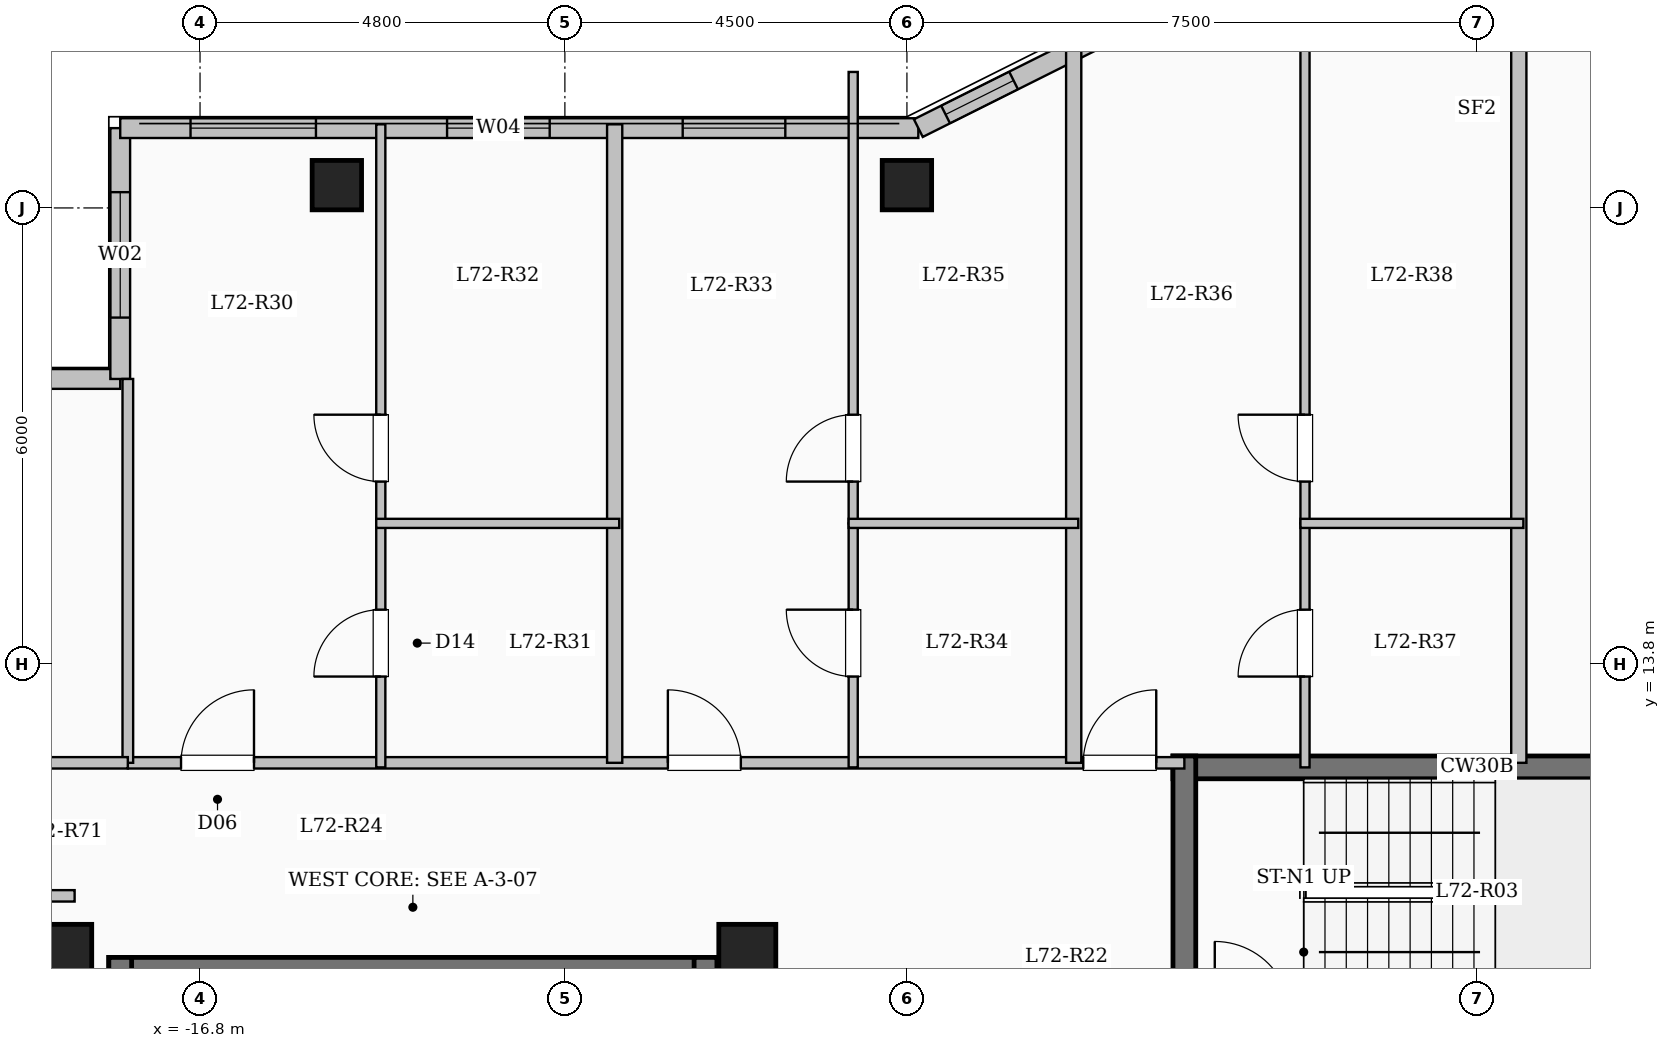
"""IFC4 building model, lengths in metres.
Left out: names, types, materials, properties, quantities, classifications, styles, units other than length and angle.
Written with IfcOpenShell. Run it as: python <this file> out.ifc"""

import sys

from ifc_helpers import new_model, si_unit, direction, frame, frame_2d, origin, origin_2d, place, context, subcontext, project, spatial, rectangle, extrude, element, fill, save


model = new_model("IFC4")
c1 = context("Model", 3, precision=1e-05, world=origin(), true_north=direction((0.0, 1.0)))
c2 = subcontext(c1, "Body", "Model", "MODEL_VIEW")
j1 = project(units=[si_unit("LENGTHUNIT", "METRE"), si_unit("PLANEANGLEUNIT", "RADIAN")], contexts=[c1])
p1 = place(None, origin())
s1 = spatial("IfcSite", under=j1, at=p1, CompositionType="ELEMENT")
p2 = place(p1, origin())
s2 = spatial("IfcBuilding", under=s1, at=p2, CompositionType="ELEMENT")
p3 = place(p2, frame((0.0, 0.0, 264.95)))
s3 = spatial("IfcBuildingStorey", under=s2, at=p3, CompositionType="ELEMENT", Elevation=264.95)
for number, where, z_axis, x_axis in (
    (1, (-9.6, 10.0, 0.0), (0.0, 0.0, 1.0), (1.0, 0.0, 0.0)),
    (2, (-18.6, 10.0, 0.0), (0.0, 0.0, 1.0), (1.0, 0.0, 0.0)),
):
    element("IfcColumn", number, at=place(p3, frame(where, z_axis=z_axis, x_axis=x_axis)), inside=s3, PredefinedType="COLUMN", context=c2, shape_type="SweptSolid", body=[
        extrude(rectangle(XDim=0.75, YDim=0.75, at=origin_2d()), origin(), (0.0, 0.0, 1.0), 3.35),
    ])
for number, where, z_axis, x_axis in (
    (3, (-15.0, 20.1, 0.0), (0.0, 0.0, 1.0), (1.0, 0.0, 0.0)),
    (4, (-7.5, 20.1, 0.0), (0.0, 0.0, 1.0), (1.0, 0.0, 0.0)),
):
    element("IfcColumn", number, at=place(p3, frame(where, z_axis=z_axis, x_axis=x_axis)), inside=s3, PredefinedType="COLUMN", context=c2, shape_type="SweptSolid", body=[
        extrude(rectangle(XDim=0.65, YDim=0.65, at=origin_2d()), origin(), (0.0, 0.0, 1.0), 3.35),
    ])
p4 = place(p3, frame((-22.65, 17.55, 0.0), z_axis=(0.0, 0.0, 1.0), x_axis=(1.0, 0.0, 0.0)))
e5 = element("IfcWall", 5, at=p4, inside=s3, PredefinedType="SOLIDWALL", context=c2, shape_type="SweptSolid", body=[
    extrude(rectangle(XDim=4.8, YDim=0.26, at=frame_2d((2.4, 0.0))), origin(), (0.0, 0.0, 1.0), 3.1),
])
p5 = place(p4, frame((1.425, 0.0, 0.9)))
e6 = element("IfcOpeningElement", 6, at=p5, cuts=e5, PredefinedType="OPENING", context=c2, shape_type="SweptSolid", body=[
    extrude(rectangle(XDim=2.0, YDim=1.7, at=frame_2d((1.0, 0.85))), frame((0.0, 0.14, 0.0), z_axis=(0.0, -1.0, 0.0), x_axis=(1.0, 0.0, 0.0)), (0.0, 0.0, 1.0), 0.28),
])
p6 = place(p3, frame((-17.85, 17.55, 0.0), z_axis=(0.0, 0.0, 1.0), x_axis=(0.0, 1.0, 0.0)))
e7 = element("IfcWall", 7, at=p6, inside=s3, PredefinedType="SOLIDWALL", context=c2, shape_type="SweptSolid", body=[
    extrude(rectangle(XDim=3.3, YDim=0.26, at=frame_2d((1.65, 0.0))), origin(), (0.0, 0.0, 1.0), 3.1),
])
p7 = place(p6, frame((0.808, 0.0, 0.9)))
e8 = element("IfcOpeningElement", 8, at=p7, cuts=e7, PredefinedType="OPENING", context=c2, shape_type="SweptSolid", body=[
    extrude(rectangle(XDim=1.65, YDim=1.6, at=frame_2d((0.825, 0.8))), frame((0.0, 0.14, 0.0), z_axis=(0.0, -1.0, 0.0), x_axis=(1.0, 0.0, 0.0)), (0.0, 0.0, 1.0), 0.28),
])
p8 = place(p3, frame((-17.85, 20.85, 0.0), z_axis=(0.0, 0.0, 1.0), x_axis=(1.0, 0.0, 0.0)))
e9 = element("IfcWall", 9, at=p8, inside=s3, PredefinedType="SOLIDWALL", context=c2, shape_type="SweptSolid", body=[
    extrude(rectangle(XDim=10.5, YDim=0.26, at=frame_2d((5.25, 0.0))), origin(), (0.0, 0.0, 1.0), 3.1),
])
p9 = place(p8, frame((0.925, 0.0, 0.9)))
e10 = element("IfcOpeningElement", 10, at=p9, cuts=e9, PredefinedType="OPENING", context=c2, shape_type="SweptSolid", body=[
    extrude(rectangle(XDim=1.65, YDim=1.6, at=frame_2d((0.825, 0.8))), frame((0.0, 0.14, 0.0), z_axis=(0.0, -1.0, 0.0), x_axis=(1.0, 0.0, 0.0)), (0.0, 0.0, 1.0), 0.28),
])
p10 = place(p8, frame((4.3, 0.0, 0.95)))
e11 = element("IfcOpeningElement", 11, at=p10, cuts=e9, PredefinedType="OPENING", context=c2, shape_type="SweptSolid", body=[
    extrude(rectangle(XDim=1.35, YDim=1.55, at=frame_2d((0.675, 0.775))), frame((0.0, 0.14, 0.0), z_axis=(0.0, -1.0, 0.0), x_axis=(1.0, 0.0, 0.0)), (0.0, 0.0, 1.0), 0.28),
])
p11 = place(p8, frame((7.4, 0.0, 0.95)))
e12 = element("IfcOpeningElement", 12, at=p11, cuts=e9, PredefinedType="OPENING", context=c2, shape_type="SweptSolid", body=[
    extrude(rectangle(XDim=1.35, YDim=1.55, at=frame_2d((0.675, 0.775))), frame((0.0, 0.14, 0.0), z_axis=(0.0, -1.0, 0.0), x_axis=(1.0, 0.0, 0.0)), (0.0, 0.0, 1.0), 0.28),
])
p12 = place(p3, frame((-7.35, 20.85, 0.0), z_axis=(0.0, 0.0, 1.0), x_axis=(0.894427191, 0.4472135955, 0.0)))
e13 = element("IfcWall", 13, at=p12, inside=s3, PredefinedType="SOLIDWALL", context=c2, shape_type="SweptSolid", body=[
    extrude(rectangle(XDim=3.354, YDim=0.26, at=frame_2d((1.677, 0.0))), origin(), (0.0, 0.0, 1.0), 3.1),
])
p13 = place(p12, frame((0.401, 0.0, 0.95)))
e14 = element("IfcOpeningElement", 14, at=p13, cuts=e13, PredefinedType="OPENING", context=c2, shape_type="SweptSolid", body=[
    extrude(rectangle(XDim=1.0, YDim=1.5, at=frame_2d((0.5, 0.75))), frame((0.0, 0.14, 0.0), z_axis=(0.0, -1.0, 0.0), x_axis=(1.0, 0.0, 0.0)), (0.0, 0.0, 1.0), 0.28),
])
p14 = place(p3, frame((-18.0, 9.79, 0.0), z_axis=(0.0, 0.0, 1.0), x_axis=(1.0, 0.0, 0.0)))
e15 = element("IfcWall", 15, at=p14, inside=s3, PredefinedType="SHEAR", context=c2, shape_type="SweptSolid", body=[
    extrude(rectangle(XDim=8.0, YDim=0.3, at=frame_2d((4.0, 0.0))), origin(), (0.0, 0.0, 1.0), 3.35),
])
for number, where, z_axis, x_axis in (
    (16, (-17.85, 6.35, 0.0), (0.0, 0.0, 1.0), (0.0, 1.0, 0.0)),
    (17, (-10.15, 6.35, 0.0), (0.0, 0.0, 1.0), (0.0, 1.0, 0.0)),
):
    element("IfcWall", number, at=place(p3, frame(where, z_axis=z_axis, x_axis=x_axis)), inside=s3, PredefinedType="SHEAR", context=c2, shape_type="SweptSolid", body=[
        extrude(rectangle(XDim=3.59, YDim=0.3, at=frame_2d((1.795, 0.0))), origin(), (0.0, 0.0, 1.0), 3.35),
    ])
p15 = place(p3, frame((-4.0, 12.44, 0.0), z_axis=(0.0, 0.0, 1.0), x_axis=(1.0, 0.0, 0.0)))
e18 = element("IfcWall", 18, at=p15, inside=s3, PredefinedType="SHEAR", context=c2, shape_type="SweptSolid", body=[
    extrude(rectangle(XDim=8.0, YDim=0.3, at=frame_2d((4.0, 0.0))), origin(), (0.0, 0.0, 1.0), 3.35),
])
p16 = place(p3, frame((-3.85, 9.0, 0.0), z_axis=(0.0, 0.0, 1.0), x_axis=(0.0, 1.0, 0.0)))
e19 = element("IfcWall", 19, at=p16, inside=s3, PredefinedType="SHEAR", context=c2, shape_type="SweptSolid", body=[
    extrude(rectangle(XDim=3.59, YDim=0.3, at=frame_2d((1.795, 0.0))), origin(), (0.0, 0.0, 1.0), 3.35),
])
p17 = place(p3, frame((-17.75, 12.5, 0.0), z_axis=(0.0, 0.0, 1.0), x_axis=(1.0, 0.0, 0.0)))
e20 = element("IfcWall", 20, at=p17, inside=s3, PredefinedType="PARTITIONING", context=c2, shape_type="SweptSolid", body=[
    extrude(rectangle(XDim=13.9, YDim=0.15, at=frame_2d((6.95, 0.0))), origin(), (0.0, 0.0, 1.0), 3.1),
])
p18 = place(p17, frame((0.7, 0.0, 0.0)))
e21 = element("IfcOpeningElement", 21, at=p18, cuts=e20, PredefinedType="OPENING", context=c2, shape_type="SweptSolid", body=[
    extrude(rectangle(XDim=0.96, YDim=2.15, at=frame_2d((0.48, 1.075))), frame((0.0, 0.085, 0.0), z_axis=(0.0, -1.0, 0.0), x_axis=(1.0, 0.0, 0.0)), (0.0, 0.0, 1.0), 0.17),
])
p19 = place(p17, frame((7.105, 0.0, 0.0)))
e22 = element("IfcOpeningElement", 22, at=p19, cuts=e20, PredefinedType="OPENING", context=c2, shape_type="SweptSolid", body=[
    extrude(rectangle(XDim=0.96, YDim=2.15, at=frame_2d((0.48, 1.075))), frame((0.0, 0.085, 0.0), z_axis=(0.0, -1.0, 0.0), x_axis=(1.0, 0.0, 0.0)), (0.0, 0.0, 1.0), 0.17),
])
p20 = place(p17, frame((12.57, 0.0, 0.0)))
e23 = element("IfcOpeningElement", 23, at=p20, cuts=e20, PredefinedType="OPENING", context=c2, shape_type="SweptSolid", body=[
    extrude(rectangle(XDim=0.96, YDim=2.15, at=frame_2d((0.48, 1.075))), frame((0.0, 0.085, 0.0), z_axis=(0.0, -1.0, 0.0), x_axis=(1.0, 0.0, 0.0)), (0.0, 0.0, 1.0), 0.17),
])
p21 = place(p3, frame((0.55, 12.5, 0.0), z_axis=(0.0, 0.0, 1.0), x_axis=(0.0, 1.0, 0.0)))
e24 = element("IfcWall", 24, at=p21, inside=s3, PredefinedType="SOLIDWALL", context=c2, shape_type="SweptSolid", body=[
    extrude(rectangle(XDim=9.88, YDim=0.2, at=frame_2d((4.94, 0.0))), origin(), (0.0, 0.0, 1.0), 3.1),
])
p22 = place(p3, frame((-11.345, 12.5, 0.0), z_axis=(0.0, 0.0, 1.0), x_axis=(0.0, 1.0, 0.0)))
e25 = element("IfcWall", 25, at=p22, inside=s3, PredefinedType="SOLIDWALL", context=c2, shape_type="SweptSolid", body=[
    extrude(rectangle(XDim=8.4, YDim=0.2, at=frame_2d((4.2, 0.0))), origin(), (0.0, 0.0, 1.0), 3.1),
])
p23 = place(p3, frame((-14.422, 12.44, 0.0), z_axis=(0.0, 0.0, 1.0), x_axis=(0.0, 1.0, 0.0)))
e26 = element("IfcWall", 26, at=p23, inside=s3, PredefinedType="PARTITIONING", context=c2, shape_type="SweptSolid", body=[
    extrude(rectangle(XDim=3.21, YDim=0.12, at=frame_2d((1.605, 0.0))), origin(), (0.0, 0.0, 1.0), 3.1),
])
p24 = place(p23, frame((1.195, 0.0, 0.0)))
e27 = element("IfcOpeningElement", 27, at=p24, cuts=e26, PredefinedType="OPENING", context=c2, shape_type="SweptSolid", body=[
    extrude(rectangle(XDim=0.88, YDim=2.1, at=frame_2d((0.44, 1.05))), frame((0.0, 0.07, 0.0), z_axis=(0.0, -1.0, 0.0), x_axis=(1.0, 0.0, 0.0)), (0.0, 0.0, 1.0), 0.14),
])
p25 = place(p3, frame((-14.422, 15.65, 0.0), z_axis=(0.0, 0.0, 1.0), x_axis=(0.0, 1.0, 0.0)))
e28 = element("IfcWall", 28, at=p25, inside=s3, PredefinedType="PARTITIONING", context=c2, shape_type="SweptSolid", body=[
    extrude(rectangle(XDim=5.25, YDim=0.12, at=frame_2d((2.625, 0.0))), origin(), (0.0, 0.0, 1.0), 3.1),
])
p26 = place(p25, frame((0.55, 0.0, 0.0)))
e29 = element("IfcOpeningElement", 29, at=p26, cuts=e28, PredefinedType="OPENING", context=c2, shape_type="SweptSolid", body=[
    extrude(rectangle(XDim=0.88, YDim=2.1, at=frame_2d((0.44, 1.05))), frame((0.0, 0.07, 0.0), z_axis=(0.0, -1.0, 0.0), x_axis=(1.0, 0.0, 0.0)), (0.0, 0.0, 1.0), 0.14),
])
p27 = place(p3, frame((-14.482, 15.65, 0.0), z_axis=(0.0, 0.0, 1.0), x_axis=(1.0, 0.0, 0.0)))
e30 = element("IfcWall", 30, at=p27, inside=s3, PredefinedType="PARTITIONING", context=c2, shape_type="SweptSolid", body=[
    extrude(rectangle(XDim=3.197, YDim=0.12, at=frame_2d((1.599, 0.0))), origin(), (0.0, 0.0, 1.0), 2.785),
])
p28 = place(p3, frame((-5.306, 12.5, 0.0), z_axis=(0.0, 0.0, 1.0), x_axis=(0.0, 1.0, 0.0)))
e31 = element("IfcWall", 31, at=p28, inside=s3, PredefinedType="SOLIDWALL", context=c2, shape_type="SweptSolid", body=[
    extrude(rectangle(XDim=9.805, YDim=0.2, at=frame_2d((4.902, 0.0))), origin(), (0.0, 0.0, 1.0), 3.1),
])
p29 = place(p3, frame((-8.207, 12.44, 0.0), z_axis=(0.0, 0.0, 1.0), x_axis=(0.0, 1.0, 0.0)))
e32 = element("IfcWall", 32, at=p29, inside=s3, PredefinedType="PARTITIONING", context=c2, shape_type="SweptSolid", body=[
    extrude(rectangle(XDim=3.21, YDim=0.12, at=frame_2d((1.605, 0.0))), origin(), (0.0, 0.0, 1.0), 3.1),
])
p30 = place(p29, frame((1.195, 0.0, 0.0)))
e33 = element("IfcOpeningElement", 33, at=p30, cuts=e32, PredefinedType="OPENING", context=c2, shape_type="SweptSolid", body=[
    extrude(rectangle(XDim=0.88, YDim=2.1, at=frame_2d((0.44, 1.05))), frame((0.0, 0.07, 0.0), z_axis=(0.0, -1.0, 0.0), x_axis=(1.0, 0.0, 0.0)), (0.0, 0.0, 1.0), 0.14),
])
p31 = place(p3, frame((-8.207, 15.65, 0.0), z_axis=(0.0, 0.0, 1.0), x_axis=(0.0, 1.0, 0.0)))
e34 = element("IfcWall", 34, at=p31, inside=s3, PredefinedType="PARTITIONING", context=c2, shape_type="SweptSolid", body=[
    extrude(rectangle(XDim=5.939, YDim=0.12, at=frame_2d((2.97, 0.0))), origin(), (0.0, 0.0, 1.0), 3.1),
])
p32 = place(p31, frame((0.55, 0.0, 0.0)))
e35 = element("IfcOpeningElement", 35, at=p32, cuts=e34, PredefinedType="OPENING", context=c2, shape_type="SweptSolid", body=[
    extrude(rectangle(XDim=0.88, YDim=2.1, at=frame_2d((0.44, 1.05))), frame((0.0, 0.07, 0.0), z_axis=(0.0, -1.0, 0.0), x_axis=(1.0, 0.0, 0.0)), (0.0, 0.0, 1.0), 0.14),
])
p33 = place(p3, frame((-8.267, 15.65, 0.0), z_axis=(0.0, 0.0, 1.0), x_axis=(1.0, 0.0, 0.0)))
e36 = element("IfcWall", 36, at=p33, inside=s3, PredefinedType="PARTITIONING", context=c2, shape_type="SweptSolid", body=[
    extrude(rectangle(XDim=3.021, YDim=0.12, at=frame_2d((1.51, 0.0))), origin(), (0.0, 0.0, 1.0), 2.785),
])
p34 = place(p3, frame((-2.263, 12.44, 0.0), z_axis=(0.0, 0.0, 1.0), x_axis=(0.0, 1.0, 0.0)))
e37 = element("IfcWall", 37, at=p34, inside=s3, PredefinedType="PARTITIONING", context=c2, shape_type="SweptSolid", body=[
    extrude(rectangle(XDim=3.21, YDim=0.12, at=frame_2d((1.605, 0.0))), origin(), (0.0, 0.0, 1.0), 3.1),
])
p35 = place(p34, frame((1.195, 0.0, 0.0)))
e38 = element("IfcOpeningElement", 38, at=p35, cuts=e37, PredefinedType="OPENING", context=c2, shape_type="SweptSolid", body=[
    extrude(rectangle(XDim=0.88, YDim=2.1, at=frame_2d((0.44, 1.05))), frame((0.0, 0.07, 0.0), z_axis=(0.0, -1.0, 0.0), x_axis=(1.0, 0.0, 0.0)), (0.0, 0.0, 1.0), 0.14),
])
p36 = place(p3, frame((-2.263, 15.65, 0.0), z_axis=(0.0, 0.0, 1.0), x_axis=(0.0, 1.0, 0.0)))
e39 = element("IfcWall", 39, at=p36, inside=s3, PredefinedType="PARTITIONING", context=c2, shape_type="SweptSolid", body=[
    extrude(rectangle(XDim=6.73, YDim=0.12, at=frame_2d((3.365, 0.0))), origin(), (0.0, 0.0, 1.0), 3.1),
])
p37 = place(p36, frame((0.55, 0.0, 0.0)))
e40 = element("IfcOpeningElement", 40, at=p37, cuts=e39, PredefinedType="OPENING", context=c2, shape_type="SweptSolid", body=[
    extrude(rectangle(XDim=0.88, YDim=2.1, at=frame_2d((0.44, 1.05))), frame((0.0, 0.07, 0.0), z_axis=(0.0, -1.0, 0.0), x_axis=(1.0, 0.0, 0.0)), (0.0, 0.0, 1.0), 0.14),
])
p38 = place(p3, frame((-2.323, 15.65, 0.0), z_axis=(0.0, 0.0, 1.0), x_axis=(1.0, 0.0, 0.0)))
e41 = element("IfcWall", 41, at=p38, inside=s3, PredefinedType="PARTITIONING", context=c2, shape_type="SweptSolid", body=[
    extrude(rectangle(XDim=2.933, YDim=0.12, at=frame_2d((1.467, 0.0))), origin(), (0.0, 0.0, 1.0), 2.785),
])
p39 = place(p3, frame((-22.68, 10.75, 0.0), z_axis=(0.0, 0.0, 1.0), x_axis=(1.0, 0.0, 0.0)))
e42 = element("IfcWall", 42, at=p39, inside=s3, PredefinedType="PARTITIONING", context=c2, shape_type="SweptSolid", body=[
    extrude(rectangle(XDim=4.23, YDim=0.15, at=frame_2d((2.115, 0.0))), origin(), (0.0, 0.0, 1.0), 3.1),
])
p40 = place(p3, frame((-17.75, 12.5, 0.0), z_axis=(0.0, 0.0, 1.0), x_axis=(0.0, 1.0, 0.0)))
e43 = element("IfcWall", 43, at=p40, inside=s3, PredefinedType="PARTITIONING", context=c2, shape_type="SweptSolid", body=[
    extrude(rectangle(XDim=5.05, YDim=0.14, at=frame_2d((2.525, 0.0))), origin(), (0.0, 0.0, 1.0), 3.1),
])
p41 = place(p3, frame((-22.68, 12.5, 0.0), z_axis=(0.0, 0.0, 1.0), x_axis=(1.0, 0.0, 0.0)))
e44 = element("IfcWall", 44, at=p41, inside=s3, PredefinedType="PARTITIONING", context=c2, shape_type="SweptSolid", body=[
    extrude(rectangle(XDim=4.93, YDim=0.15, at=frame_2d((2.465, 0.0))), origin(), (0.0, 0.0, 1.0), 3.1),
])
p42 = place(p41, frame((1.99, 0.0, 0.0)))
e45 = element("IfcOpeningElement", 45, at=p42, cuts=e44, PredefinedType="OPENING", context=c2, shape_type="SweptSolid", body=[
    extrude(rectangle(XDim=0.95, YDim=2.15, at=frame_2d((0.475, 1.075))), frame((0.0, 0.085, 0.0), z_axis=(0.0, -1.0, 0.0), x_axis=(1.0, 0.0, 0.0)), (0.0, 0.0, 1.0), 0.17),
])
p43 = place(p7, origin())
e46 = element("IfcWindow", 46, at=p43, inside=s3, PartitioningType="SINGLE_PANEL", PredefinedType="WINDOW", context=c2, shape_type="SweptSolid", body=[
    extrude(rectangle(XDim=1.65, YDim=1.6, at=frame_2d((0.825, 0.8))), frame((0.0, 0.03, 0.0), z_axis=(0.0, -1.0, 0.0), x_axis=(1.0, 0.0, 0.0)), (0.0, 0.0, 1.0), 0.06),
])
fill(e8, e46)
p44 = place(p9, origin())
e47 = element("IfcWindow", 47, at=p44, inside=s3, PartitioningType="SINGLE_PANEL", PredefinedType="WINDOW", context=c2, shape_type="SweptSolid", body=[
    extrude(rectangle(XDim=1.65, YDim=1.6, at=frame_2d((0.825, 0.8))), frame((0.0, 0.03, 0.0), z_axis=(0.0, -1.0, 0.0), x_axis=(1.0, 0.0, 0.0)), (0.0, 0.0, 1.0), 0.06),
])
fill(e10, e47)
p45 = place(p10, origin())
e48 = element("IfcWindow", 48, at=p45, inside=s3, PartitioningType="SINGLE_PANEL", PredefinedType="WINDOW", context=c2, shape_type="SweptSolid", body=[
    extrude(rectangle(XDim=1.35, YDim=1.55, at=frame_2d((0.675, 0.775))), frame((0.0, 0.03, 0.0), z_axis=(0.0, -1.0, 0.0), x_axis=(1.0, 0.0, 0.0)), (0.0, 0.0, 1.0), 0.06),
])
fill(e11, e48)
p46 = place(p11, origin())
e49 = element("IfcWindow", 49, at=p46, inside=s3, PartitioningType="SINGLE_PANEL", PredefinedType="WINDOW", context=c2, shape_type="SweptSolid", body=[
    extrude(rectangle(XDim=1.35, YDim=1.55, at=frame_2d((0.675, 0.775))), frame((0.0, 0.03, 0.0), z_axis=(0.0, -1.0, 0.0), x_axis=(1.0, 0.0, 0.0)), (0.0, 0.0, 1.0), 0.06),
])
fill(e12, e49)
p47 = place(p13, origin())
e50 = element("IfcWindow", 50, at=p47, inside=s3, PartitioningType="SINGLE_PANEL", PredefinedType="WINDOW", context=c2, shape_type="SweptSolid", body=[
    extrude(rectangle(XDim=1.0, YDim=1.5, at=frame_2d((0.5, 0.75))), frame((0.0, 0.03, 0.0), z_axis=(0.0, -1.0, 0.0), x_axis=(1.0, 0.0, 0.0)), (0.0, 0.0, 1.0), 0.06),
])
fill(e14, e50)
p48 = place(p18, origin())
e51 = element("IfcDoor", 51, at=p48, inside=s3, OperationType="SINGLE_SWING_RIGHT", PredefinedType="DOOR", context=c2, shape_type="SweptSolid", body=[
    extrude(rectangle(XDim=0.96, YDim=2.15, at=frame_2d((0.48, 1.075))), frame((0.0, 0.025, 0.0), z_axis=(0.0, -1.0, 0.0), x_axis=(1.0, 0.0, 0.0)), (0.0, 0.0, 1.0), 0.05),
])
fill(e21, e51)
p49 = place(p24, origin())
e52 = element("IfcDoor", 52, at=p49, inside=s3, OperationType="SINGLE_SWING_LEFT", PredefinedType="DOOR", context=c2, shape_type="SweptSolid", body=[
    extrude(rectangle(XDim=0.88, YDim=2.1, at=frame_2d((0.44, 1.05))), frame((0.0, 0.025, 0.0), z_axis=(0.0, -1.0, 0.0), x_axis=(1.0, 0.0, 0.0)), (0.0, 0.0, 1.0), 0.05),
])
fill(e27, e52)
p50 = place(p26, origin())
e53 = element("IfcDoor", 53, at=p50, inside=s3, OperationType="SINGLE_SWING_RIGHT", PredefinedType="DOOR", context=c2, shape_type="SweptSolid", body=[
    extrude(rectangle(XDim=0.88, YDim=2.1, at=frame_2d((0.44, 1.05))), frame((0.0, 0.025, 0.0), z_axis=(0.0, -1.0, 0.0), x_axis=(1.0, 0.0, 0.0)), (0.0, 0.0, 1.0), 0.05),
])
fill(e29, e53)
p51 = place(p19, origin())
e54 = element("IfcDoor", 54, at=p51, inside=s3, OperationType="SINGLE_SWING_LEFT", PredefinedType="DOOR", context=c2, shape_type="SweptSolid", body=[
    extrude(rectangle(XDim=0.96, YDim=2.15, at=frame_2d((0.48, 1.075))), frame((0.0, 0.025, 0.0), z_axis=(0.0, -1.0, 0.0), x_axis=(1.0, 0.0, 0.0)), (0.0, 0.0, 1.0), 0.05),
])
fill(e22, e54)
p52 = place(p30, origin())
e55 = element("IfcDoor", 55, at=p52, inside=s3, OperationType="SINGLE_SWING_RIGHT", PredefinedType="DOOR", context=c2, shape_type="SweptSolid", body=[
    extrude(rectangle(XDim=0.88, YDim=2.1, at=frame_2d((0.44, 1.05))), frame((0.0, 0.025, 0.0), z_axis=(0.0, -1.0, 0.0), x_axis=(1.0, 0.0, 0.0)), (0.0, 0.0, 1.0), 0.05),
])
fill(e33, e55)
p53 = place(p32, origin())
e56 = element("IfcDoor", 56, at=p53, inside=s3, OperationType="SINGLE_SWING_LEFT", PredefinedType="DOOR", context=c2, shape_type="SweptSolid", body=[
    extrude(rectangle(XDim=0.88, YDim=2.1, at=frame_2d((0.44, 1.05))), frame((0.0, 0.025, 0.0), z_axis=(0.0, -1.0, 0.0), x_axis=(1.0, 0.0, 0.0)), (0.0, 0.0, 1.0), 0.05),
])
fill(e35, e56)
p54 = place(p20, origin())
e57 = element("IfcDoor", 57, at=p54, inside=s3, OperationType="SINGLE_SWING_RIGHT", PredefinedType="DOOR", context=c2, shape_type="SweptSolid", body=[
    extrude(rectangle(XDim=0.96, YDim=2.15, at=frame_2d((0.48, 1.075))), frame((0.0, 0.025, 0.0), z_axis=(0.0, -1.0, 0.0), x_axis=(1.0, 0.0, 0.0)), (0.0, 0.0, 1.0), 0.05),
])
fill(e23, e57)
p55 = place(p35, origin())
e58 = element("IfcDoor", 58, at=p55, inside=s3, OperationType="SINGLE_SWING_LEFT", PredefinedType="DOOR", context=c2, shape_type="SweptSolid", body=[
    extrude(rectangle(XDim=0.88, YDim=2.1, at=frame_2d((0.44, 1.05))), frame((0.0, 0.025, 0.0), z_axis=(0.0, -1.0, 0.0), x_axis=(1.0, 0.0, 0.0)), (0.0, 0.0, 1.0), 0.05),
])
fill(e38, e58)
p56 = place(p37, origin())
e59 = element("IfcDoor", 59, at=p56, inside=s3, OperationType="SINGLE_SWING_RIGHT", PredefinedType="DOOR", context=c2, shape_type="SweptSolid", body=[
    extrude(rectangle(XDim=0.88, YDim=2.1, at=frame_2d((0.44, 1.05))), frame((0.0, 0.025, 0.0), z_axis=(0.0, -1.0, 0.0), x_axis=(1.0, 0.0, 0.0)), (0.0, 0.0, 1.0), 0.05),
])
fill(e40, e59)
save(model, sys.argv[1])
